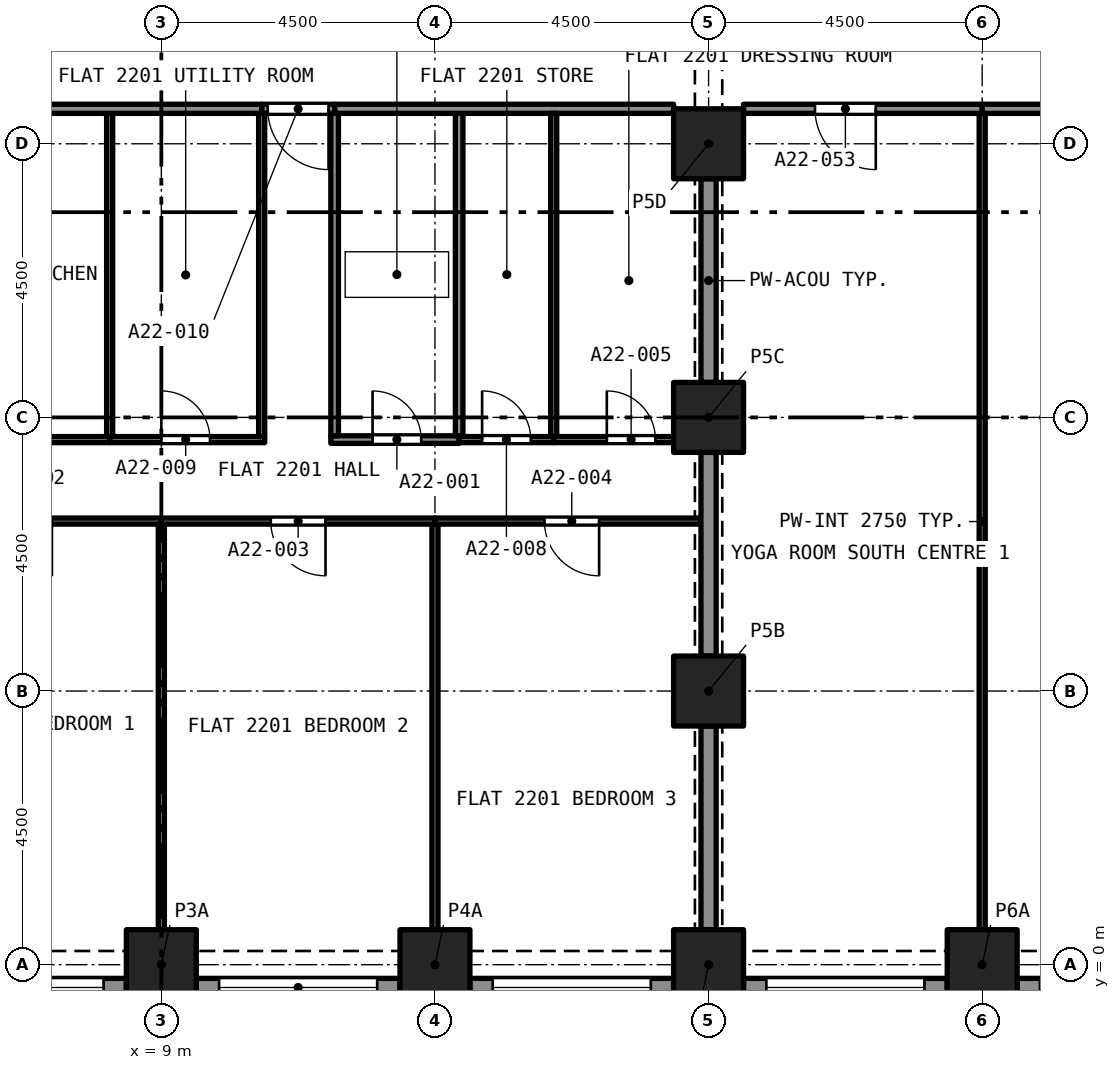
"""IFC4 building model, lengths in metres.
Left out: names, types, materials, properties, quantities, classifications, styles, units other than length and angle.
Written with IfcOpenShell. Run it as: python <this file> out.ifc"""

import sys

from ifc_helpers import new_model, si_unit, direction, frame, frame_2d, origin, origin_2d, place, context, subcontext, project, spatial, rectangle, extrude, element, fill, save


model = new_model("IFC4")
c1 = context("Model", 3, precision=1e-05, world=origin(), true_north=direction((0.0, 1.0)))
c2 = subcontext(c1, "Body", "Model", "MODEL_VIEW")
j1 = project(units=[si_unit("LENGTHUNIT", "METRE"), si_unit("PLANEANGLEUNIT", "RADIAN")], contexts=[c1])
p1 = place(None, origin())
s1 = spatial("IfcSite", under=j1, at=p1, CompositionType="ELEMENT")
p2 = place(p1, origin())
s2 = spatial("IfcBuilding", under=s1, at=p2, CompositionType="ELEMENT")
p3 = place(p2, frame((0.0, 0.0, 83.2)))
s3 = spatial("IfcBuildingStorey", under=s2, at=p3, CompositionType="ELEMENT", Elevation=83.2)
for number, where, z_axis, x_axis in (
    (1, (9.0, 0.0, 0.0), (0.0, 0.0, 1.0), (1.0, 0.0, 0.0)),
    (2, (13.5, 0.0, 0.0), (0.0, 0.0, 1.0), (1.0, 0.0, 0.0)),
    (3, (18.0, 0.0, 0.0), (0.0, 0.0, 1.0), (1.0, 0.0, 0.0)),
    (4, (22.5, 0.0, 0.0), (0.0, 0.0, 1.0), (1.0, 0.0, 0.0)),
    (5, (18.0, 4.5, 0.0), (0.0, 0.0, 1.0), (1.0, 0.0, 0.0)),
    (6, (18.0, 9.0, 0.0), (0.0, 0.0, 1.0), (1.0, 0.0, 0.0)),
    (7, (18.0, 13.5, 0.0), (0.0, 0.0, 1.0), (1.0, 0.0, 0.0)),
):
    element("IfcColumn", number, at=place(p3, frame(where, z_axis=z_axis, x_axis=x_axis)), inside=s3, PredefinedType="COLUMN", context=c2, shape_type="SweptSolid", body=[
        extrude(rectangle(XDim=1.15, YDim=1.15, at=origin_2d()), origin(), (0.0, 0.0, 1.0), 3.2),
    ])
p4 = place(p3, frame((8.425, -0.375, 0.0), z_axis=(0.0, 0.0, 1.0), x_axis=(-1.0, 0.0, 0.0)))
e8 = element("IfcWall", 8, at=p4, inside=s3, PredefinedType="SOLIDWALL", context=c2, shape_type="SweptSolid", body=[
    extrude(rectangle(XDim=3.35, YDim=0.3, at=frame_2d((1.675, 0.0))), origin(), (0.0, 0.0, 1.0), 3.2),
])
p5 = place(p4, frame((0.375, 0.0, 0.45)))
e9 = element("IfcOpeningElement", 9, at=p5, cuts=e8, PredefinedType="OPENING", context=c2, shape_type="SweptSolid", body=[
    extrude(rectangle(XDim=2.6, YDim=1.95, at=frame_2d((1.3, 0.975))), frame((0.0, 0.16, 0.0), z_axis=(0.0, -1.0, 0.0), x_axis=(1.0, 0.0, 0.0)), (0.0, 0.0, 1.0), 0.32),
])
p6 = place(p3, frame((12.925, -0.375, 0.0), z_axis=(0.0, 0.0, 1.0), x_axis=(-1.0, 0.0, 0.0)))
e10 = element("IfcWall", 10, at=p6, inside=s3, PredefinedType="SOLIDWALL", context=c2, shape_type="SweptSolid", body=[
    extrude(rectangle(XDim=3.35, YDim=0.3, at=frame_2d((1.675, 0.0))), origin(), (0.0, 0.0, 1.0), 3.2),
])
p7 = place(p6, frame((0.375, 0.0, 0.45)))
e11 = element("IfcOpeningElement", 11, at=p7, cuts=e10, PredefinedType="OPENING", context=c2, shape_type="SweptSolid", body=[
    extrude(rectangle(XDim=2.6, YDim=1.95, at=frame_2d((1.3, 0.975))), frame((0.0, 0.16, 0.0), z_axis=(0.0, -1.0, 0.0), x_axis=(1.0, 0.0, 0.0)), (0.0, 0.0, 1.0), 0.32),
])
p8 = place(p3, frame((17.425, -0.375, 0.0), z_axis=(0.0, 0.0, 1.0), x_axis=(-1.0, 0.0, 0.0)))
e12 = element("IfcWall", 12, at=p8, inside=s3, PredefinedType="SOLIDWALL", context=c2, shape_type="SweptSolid", body=[
    extrude(rectangle(XDim=3.35, YDim=0.3, at=frame_2d((1.675, 0.0))), origin(), (0.0, 0.0, 1.0), 3.2),
])
p9 = place(p8, frame((0.375, 0.0, 0.45)))
e13 = element("IfcOpeningElement", 13, at=p9, cuts=e12, PredefinedType="OPENING", context=c2, shape_type="SweptSolid", body=[
    extrude(rectangle(XDim=2.6, YDim=1.95, at=frame_2d((1.3, 0.975))), frame((0.0, 0.16, 0.0), z_axis=(0.0, -1.0, 0.0), x_axis=(1.0, 0.0, 0.0)), (0.0, 0.0, 1.0), 0.32),
])
p10 = place(p3, frame((21.925, -0.375, 0.0), z_axis=(0.0, 0.0, 1.0), x_axis=(-1.0, 0.0, 0.0)))
e14 = element("IfcWall", 14, at=p10, inside=s3, PredefinedType="SOLIDWALL", context=c2, shape_type="SweptSolid", body=[
    extrude(rectangle(XDim=3.35, YDim=0.3, at=frame_2d((1.675, 0.0))), origin(), (0.0, 0.0, 1.0), 3.2),
])
p11 = place(p10, frame((0.375, 0.0, 0.45)))
e15 = element("IfcOpeningElement", 15, at=p11, cuts=e14, PredefinedType="OPENING", context=c2, shape_type="SweptSolid", body=[
    extrude(rectangle(XDim=2.6, YDim=1.95, at=frame_2d((1.3, 0.975))), frame((0.0, 0.16, 0.0), z_axis=(0.0, -1.0, 0.0), x_axis=(1.0, 0.0, 0.0)), (0.0, 0.0, 1.0), 0.32),
])
p12 = place(p3, frame((26.425, -0.375, 0.0), z_axis=(0.0, 0.0, 1.0), x_axis=(-1.0, 0.0, 0.0)))
e16 = element("IfcWall", 16, at=p12, inside=s3, PredefinedType="SOLIDWALL", context=c2, shape_type="SweptSolid", body=[
    extrude(rectangle(XDim=3.35, YDim=0.3, at=frame_2d((1.675, 0.0))), origin(), (0.0, 0.0, 1.0), 3.2),
])
p13 = place(p12, frame((0.375, 0.0, 0.45)))
e17 = element("IfcOpeningElement", 17, at=p13, cuts=e16, PredefinedType="OPENING", context=c2, shape_type="SweptSolid", body=[
    extrude(rectangle(XDim=2.6, YDim=1.95, at=frame_2d((1.3, 0.975))), frame((0.0, 0.16, 0.0), z_axis=(0.0, -1.0, 0.0), x_axis=(1.0, 0.0, 0.0)), (0.0, 0.0, 1.0), 0.32),
])
p14 = place(p3, frame((11.788, 8.635, 0.0), z_axis=(0.0, 0.0, 1.0), x_axis=(1.0, 0.0, 0.0)))
e18 = element("IfcWall", 18, at=p14, inside=s3, PredefinedType="PARTITIONING", context=c2, shape_type="SweptSolid", body=[
    extrude(rectangle(XDim=2.11, YDim=0.125, at=frame_2d((1.055, 0.0))), origin(), (0.0, 0.0, 1.0), 2.9),
])
p15 = place(p14, frame((0.686, 0.0, 0.0)))
e19 = element("IfcOpeningElement", 19, at=p15, cuts=e18, PredefinedType="OPENING", context=c2, shape_type="SweptSolid", body=[
    extrude(rectangle(XDim=0.8, YDim=2.1, at=frame_2d((0.4, 1.05))), frame((0.0, 0.073, 0.0), z_axis=(0.0, -1.0, 0.0), x_axis=(1.0, 0.0, 0.0)), (0.0, 0.0, 1.0), 0.145),
])
for number, where, z_axis, x_axis in (
    (20, (11.85, 8.698, 0.0), (0.0, 0.0, 1.0), (0.0, 1.0, 0.0)),
    (21, (13.898, 8.698, 0.0), (0.0, 0.0, 1.0), (0.0, 1.0, 0.0)),
):
    element("IfcWall", number, at=place(p3, frame(where, z_axis=z_axis, x_axis=x_axis)), inside=s3, PredefinedType="PARTITIONING", context=c2, shape_type="SweptSolid", body=[
        extrude(rectangle(XDim=5.302, YDim=0.125, at=frame_2d((2.651, 0.0))), origin(), (0.0, 0.0, 1.0), 2.9),
    ])
p16 = place(p3, frame((11.85, 14.075, 0.0), z_axis=(0.0, 0.0, 1.0), x_axis=(1.0, 0.0, 0.0)))
e22 = element("IfcWall", 22, at=p16, inside=s3, PredefinedType="PARTITIONING", context=c2, shape_type="SweptSolid", body=[
    extrude(rectangle(XDim=5.575, YDim=0.15, at=frame_2d((2.788, 0.0))), origin(), (0.0, 0.0, 1.0), 2.9),
])
p17 = place(p3, frame((9.0, 0.575, 0.0), z_axis=(0.0, 0.0, 1.0), x_axis=(0.0, 1.0, 0.0)))
e23 = element("IfcWall", 23, at=p17, inside=s3, PredefinedType="PARTITIONING", context=c2, shape_type="SweptSolid", body=[
    extrude(rectangle(XDim=6.67, YDim=0.1, at=frame_2d((3.335, 0.0))), origin(), (0.0, 0.0, 1.0), 2.9),
])
p18 = place(p3, frame((9.0, 7.295, 0.0), z_axis=(0.0, 0.0, 1.0), x_axis=(-1.0, 0.0, 0.0)))
e24 = element("IfcWall", 24, at=p18, inside=s3, PredefinedType="PARTITIONING", context=c2, shape_type="SweptSolid", body=[
    extrude(rectangle(XDim=4.45, YDim=0.1, at=frame_2d((2.225, 0.0))), origin(), (0.0, 0.0, 1.0), 2.9),
])
p19 = place(p18, frame((1.8, 0.0, 0.0)))
e25 = element("IfcOpeningElement", 25, at=p19, cuts=e24, PredefinedType="OPENING", context=c2, shape_type="SweptSolid", body=[
    extrude(rectangle(XDim=0.9, YDim=2.1, at=frame_2d((0.45, 1.05))), frame((0.0, 0.06, 0.0), z_axis=(0.0, -1.0, 0.0), x_axis=(1.0, 0.0, 0.0)), (0.0, 0.0, 1.0), 0.12),
])
p20 = place(p3, frame((13.5, 0.575, 0.0), z_axis=(0.0, 0.0, 1.0), x_axis=(0.0, 1.0, 0.0)))
e26 = element("IfcWall", 26, at=p20, inside=s3, PredefinedType="PARTITIONING", context=c2, shape_type="SweptSolid", body=[
    extrude(rectangle(XDim=6.67, YDim=0.1, at=frame_2d((3.335, 0.0))), origin(), (0.0, 0.0, 1.0), 2.9),
])
p21 = place(p3, frame((13.5, 7.295, 0.0), z_axis=(0.0, 0.0, 1.0), x_axis=(-1.0, 0.0, 0.0)))
e27 = element("IfcWall", 27, at=p21, inside=s3, PredefinedType="PARTITIONING", context=c2, shape_type="SweptSolid", body=[
    extrude(rectangle(XDim=4.5, YDim=0.1, at=frame_2d((2.25, 0.0))), origin(), (0.0, 0.0, 1.0), 2.9),
])
p22 = place(p21, frame((1.8, 0.0, 0.0)))
e28 = element("IfcOpeningElement", 28, at=p22, cuts=e27, PredefinedType="OPENING", context=c2, shape_type="SweptSolid", body=[
    extrude(rectangle(XDim=0.9, YDim=2.1, at=frame_2d((0.45, 1.05))), frame((0.0, 0.06, 0.0), z_axis=(0.0, -1.0, 0.0), x_axis=(1.0, 0.0, 0.0)), (0.0, 0.0, 1.0), 0.12),
])
p23 = place(p3, frame((17.875, 7.295, 0.0), z_axis=(0.0, 0.0, 1.0), x_axis=(-1.0, 0.0, 0.0)))
e29 = element("IfcWall", 29, at=p23, inside=s3, PredefinedType="PARTITIONING", context=c2, shape_type="SweptSolid", body=[
    extrude(rectangle(XDim=4.375, YDim=0.1, at=frame_2d((2.188, 0.0))), origin(), (0.0, 0.0, 1.0), 2.9),
])
p24 = place(p23, frame((1.675, 0.0, 0.0)))
e30 = element("IfcOpeningElement", 30, at=p24, cuts=e29, PredefinedType="OPENING", context=c2, shape_type="SweptSolid", body=[
    extrude(rectangle(XDim=0.9, YDim=2.1, at=frame_2d((0.45, 1.05))), frame((0.0, 0.06, 0.0), z_axis=(0.0, -1.0, 0.0), x_axis=(1.0, 0.0, 0.0)), (0.0, 0.0, 1.0), 0.12),
])
for number, where, z_axis, x_axis in (
    (31, (18.0, 5.075, 0.0), (0.0, 0.0, 1.0), (0.0, 1.0, 0.0)),
    (32, (18.0, 0.575, 0.0), (0.0, 0.0, 1.0), (0.0, 1.0, 0.0)),
):
    element("IfcWall", number, at=place(p3, frame(where, z_axis=z_axis, x_axis=x_axis)), inside=s3, PredefinedType="PARTITIONING", context=c2, shape_type="SweptSolid", body=[
        extrude(rectangle(XDim=3.35, YDim=0.25, at=frame_2d((1.675, 0.0))), origin(), (0.0, 0.0, 1.0), 2.38),
    ])
p25 = place(p3, frame((15.453, 8.635, 0.0), z_axis=(0.0, 0.0, 1.0), x_axis=(1.0, 0.0, 0.0)))
e33 = element("IfcWall", 33, at=p25, inside=s3, PredefinedType="PARTITIONING", context=c2, shape_type="SweptSolid", body=[
    extrude(rectangle(XDim=1.972, YDim=0.1, at=frame_2d((0.986, 0.0))), origin(), (0.0, 0.0, 1.0), 2.9),
])
p26 = place(p25, frame((0.874, 0.0, 0.0)))
e34 = element("IfcOpeningElement", 34, at=p26, cuts=e33, PredefinedType="OPENING", context=c2, shape_type="SweptSolid", body=[
    extrude(rectangle(XDim=0.8, YDim=2.1, at=frame_2d((0.4, 1.05))), frame((0.0, 0.06, 0.0), z_axis=(0.0, -1.0, 0.0), x_axis=(1.0, 0.0, 0.0)), (0.0, 0.0, 1.0), 0.12),
])
p27 = place(p3, frame((15.453, 8.685, 0.0), z_axis=(0.0, 0.0, 1.0), x_axis=(0.0, 1.0, 0.0)))
e35 = element("IfcWall", 35, at=p27, inside=s3, PredefinedType="PARTITIONING", context=c2, shape_type="SweptSolid", body=[
    extrude(rectangle(XDim=5.315, YDim=0.1, at=frame_2d((2.657, 0.0))), origin(), (0.0, 0.0, 1.0), 2.9),
])
p28 = place(p3, frame((18.0, 9.575, 0.0), z_axis=(0.0, 0.0, 1.0), x_axis=(0.0, 1.0, 0.0)))
e36 = element("IfcWall", 36, at=p28, inside=s3, PredefinedType="PARTITIONING", context=c2, shape_type="SweptSolid", body=[
    extrude(rectangle(XDim=3.35, YDim=0.25, at=frame_2d((1.675, 0.0))), origin(), (0.0, 0.0, 1.0), 2.38),
])
p29 = place(p3, frame((4.55, 8.635, 0.0), z_axis=(0.0, 0.0, 1.0), x_axis=(1.0, 0.0, 0.0)))
e37 = element("IfcWall", 37, at=p29, inside=s3, PredefinedType="PARTITIONING", context=c2, shape_type="SweptSolid", body=[
    extrude(rectangle(XDim=3.6, YDim=0.1, at=frame_2d((1.8, 0.0))), origin(), (0.0, 0.0, 1.0), 2.9),
])
p30 = place(p29, frame((1.325, 0.0, 0.0)))
e38 = element("IfcOpeningElement", 38, at=p30, cuts=e37, PredefinedType="OPENING", context=c2, shape_type="SweptSolid", body=[
    extrude(rectangle(XDim=0.9, YDim=2.1, at=frame_2d((0.45, 1.05))), frame((0.0, 0.06, 0.0), z_axis=(0.0, -1.0, 0.0), x_axis=(1.0, 0.0, 0.0)), (0.0, 0.0, 1.0), 0.12),
])
p31 = place(p3, frame((13.898, 8.635, 0.0), z_axis=(0.0, 0.0, 1.0), x_axis=(1.0, 0.0, 0.0)))
e39 = element("IfcWall", 39, at=p31, inside=s3, PredefinedType="PARTITIONING", context=c2, shape_type="SweptSolid", body=[
    extrude(rectangle(XDim=1.555, YDim=0.1, at=frame_2d((0.778, 0.0))), origin(), (0.0, 0.0, 1.0), 2.9),
])
p32 = place(p31, frame((0.378, 0.0, 0.0)))
e40 = element("IfcOpeningElement", 40, at=p32, cuts=e39, PredefinedType="OPENING", context=c2, shape_type="SweptSolid", body=[
    extrude(rectangle(XDim=0.8, YDim=2.1, at=frame_2d((0.4, 1.05))), frame((0.0, 0.06, 0.0), z_axis=(0.0, -1.0, 0.0), x_axis=(1.0, 0.0, 0.0)), (0.0, 0.0, 1.0), 0.12),
])
p33 = place(p3, frame((8.15, 8.635, 0.0), z_axis=(0.0, 0.0, 1.0), x_axis=(1.0, 0.0, 0.0)))
e41 = element("IfcWall", 41, at=p33, inside=s3, PredefinedType="PARTITIONING", context=c2, shape_type="SweptSolid", body=[
    extrude(rectangle(XDim=2.55, YDim=0.1, at=frame_2d((1.275, 0.0))), origin(), (0.0, 0.0, 1.0), 2.9),
])
p34 = place(p33, frame((0.85, 0.0, 0.0)))
e42 = element("IfcOpeningElement", 42, at=p34, cuts=e41, PredefinedType="OPENING", context=c2, shape_type="SweptSolid", body=[
    extrude(rectangle(XDim=0.8, YDim=2.1, at=frame_2d((0.4, 1.05))), frame((0.0, 0.06, 0.0), z_axis=(0.0, -1.0, 0.0), x_axis=(1.0, 0.0, 0.0)), (0.0, 0.0, 1.0), 0.12),
])
p35 = place(p3, frame((10.65, 8.685, 0.0), z_axis=(0.0, 0.0, 1.0), x_axis=(0.0, 1.0, 0.0)))
e43 = element("IfcWall", 43, at=p35, inside=s3, PredefinedType="PARTITIONING", context=c2, shape_type="SweptSolid", body=[
    extrude(rectangle(XDim=5.315, YDim=0.1, at=frame_2d((2.657, 0.0))), origin(), (0.0, 0.0, 1.0), 2.9),
])
p36 = place(p3, frame((11.85, 14.075, 0.0), z_axis=(0.0, 0.0, 1.0), x_axis=(-1.0, 0.0, 0.0)))
e44 = element("IfcWall", 44, at=p36, inside=s3, PredefinedType="PARTITIONING", context=c2, shape_type="SweptSolid", body=[
    extrude(rectangle(XDim=1.2, YDim=0.15, at=frame_2d((0.6, 0.0))), origin(), (0.0, 0.0, 1.0), 2.9),
])
p37 = place(p36, frame((0.1, 0.0, 0.0)))
e45 = element("IfcOpeningElement", 45, at=p37, cuts=e44, PredefinedType="OPENING", context=c2, shape_type="SweptSolid", body=[
    extrude(rectangle(XDim=1.0, YDim=2.1, at=frame_2d((0.5, 1.05))), frame((0.0, 0.085, 0.0), z_axis=(0.0, -1.0, 0.0), x_axis=(1.0, 0.0, 0.0)), (0.0, 0.0, 1.0), 0.17),
])
p38 = place(p3, frame((8.15, 8.685, 0.0), z_axis=(0.0, 0.0, 1.0), x_axis=(0.0, 1.0, 0.0)))
e46 = element("IfcWall", 46, at=p38, inside=s3, PredefinedType="PARTITIONING", context=c2, shape_type="SweptSolid", body=[
    extrude(rectangle(XDim=5.315, YDim=0.1, at=frame_2d((2.657, 0.0))), origin(), (0.0, 0.0, 1.0), 2.9),
])
p39 = place(p3, frame((0.575, 14.075, 0.0), z_axis=(0.0, 0.0, 1.0), x_axis=(1.0, 0.0, 0.0)))
e47 = element("IfcWall", 47, at=p39, inside=s3, PredefinedType="PARTITIONING", context=c2, shape_type="SweptSolid", body=[
    extrude(rectangle(XDim=10.075, YDim=0.15, at=frame_2d((5.038, 0.0))), origin(), (0.0, 0.0, 1.0), 2.9),
])
p40 = place(p3, frame((22.5, 0.575, 0.0), z_axis=(0.0, 0.0, 1.0), x_axis=(0.0, 1.0, 0.0)))
e48 = element("IfcWall", 48, at=p40, inside=s3, PredefinedType="PARTITIONING", context=c2, shape_type="SweptSolid", body=[
    extrude(rectangle(XDim=13.425, YDim=0.1, at=frame_2d((6.712, 0.0))), origin(), (0.0, 0.0, 1.0), 2.75),
])
p41 = place(p3, frame((22.5, 14.075, 0.0), z_axis=(0.0, 0.0, 1.0), x_axis=(-1.0, 0.0, 0.0)))
e49 = element("IfcWall", 49, at=p41, inside=s3, PredefinedType="PARTITIONING", context=c2, shape_type="SweptSolid", body=[
    extrude(rectangle(XDim=3.925, YDim=0.15, at=frame_2d((1.962, 0.0))), origin(), (0.0, 0.0, 1.0), 2.75),
])
p42 = place(p41, frame((1.75, 0.0, 0.0)))
e50 = element("IfcOpeningElement", 50, at=p42, cuts=e49, PredefinedType="OPENING", context=c2, shape_type="SweptSolid", body=[
    extrude(rectangle(XDim=1.0, YDim=2.1, at=frame_2d((0.5, 1.05))), frame((0.0, 0.085, 0.0), z_axis=(0.0, -1.0, 0.0), x_axis=(1.0, 0.0, 0.0)), (0.0, 0.0, 1.0), 0.17),
])
p43 = place(p3, frame((27.0, 14.075, 0.0), z_axis=(0.0, 0.0, 1.0), x_axis=(-1.0, 0.0, 0.0)))
e51 = element("IfcWall", 51, at=p43, inside=s3, PredefinedType="PARTITIONING", context=c2, shape_type="SweptSolid", body=[
    extrude(rectangle(XDim=4.5, YDim=0.15, at=frame_2d((2.25, 0.0))), origin(), (0.0, 0.0, 1.0), 2.75),
])
p44 = place(p43, frame((1.75, 0.0, 0.0)))
e52 = element("IfcOpeningElement", 52, at=p44, cuts=e51, PredefinedType="OPENING", context=c2, shape_type="SweptSolid", body=[
    extrude(rectangle(XDim=1.0, YDim=2.1, at=frame_2d((0.5, 1.05))), frame((0.0, 0.085, 0.0), z_axis=(0.0, -1.0, 0.0), x_axis=(1.0, 0.0, 0.0)), (0.0, 0.0, 1.0), 0.17),
])
p45 = place(p5, origin())
e53 = element("IfcWindow", 53, at=p45, inside=s3, PartitioningType="SINGLE_PANEL", PredefinedType="WINDOW", context=c2, shape_type="SweptSolid", body=[
    extrude(rectangle(XDim=2.6, YDim=1.95, at=frame_2d((1.3, 0.975))), frame((0.0, 0.03, 0.0), z_axis=(0.0, -1.0, 0.0), x_axis=(1.0, 0.0, 0.0)), (0.0, 0.0, 1.0), 0.06),
])
fill(e9, e53)
p46 = place(p7, origin())
e54 = element("IfcWindow", 54, at=p46, inside=s3, PartitioningType="SINGLE_PANEL", PredefinedType="WINDOW", context=c2, shape_type="SweptSolid", body=[
    extrude(rectangle(XDim=2.6, YDim=1.95, at=frame_2d((1.3, 0.975))), frame((0.0, 0.03, 0.0), z_axis=(0.0, -1.0, 0.0), x_axis=(1.0, 0.0, 0.0)), (0.0, 0.0, 1.0), 0.06),
])
fill(e11, e54)
p47 = place(p9, origin())
e55 = element("IfcWindow", 55, at=p47, inside=s3, PartitioningType="SINGLE_PANEL", PredefinedType="WINDOW", context=c2, shape_type="SweptSolid", body=[
    extrude(rectangle(XDim=2.6, YDim=1.95, at=frame_2d((1.3, 0.975))), frame((0.0, 0.03, 0.0), z_axis=(0.0, -1.0, 0.0), x_axis=(1.0, 0.0, 0.0)), (0.0, 0.0, 1.0), 0.06),
])
fill(e13, e55)
p48 = place(p11, origin())
e56 = element("IfcWindow", 56, at=p48, inside=s3, PartitioningType="SINGLE_PANEL", PredefinedType="WINDOW", context=c2, shape_type="SweptSolid", body=[
    extrude(rectangle(XDim=2.6, YDim=1.95, at=frame_2d((1.3, 0.975))), frame((0.0, 0.03, 0.0), z_axis=(0.0, -1.0, 0.0), x_axis=(1.0, 0.0, 0.0)), (0.0, 0.0, 1.0), 0.06),
])
fill(e15, e56)
p49 = place(p15, origin())
e57 = element("IfcDoor", 57, at=p49, inside=s3, OperationType="SINGLE_SWING_RIGHT", PredefinedType="DOOR", context=c2, shape_type="SweptSolid", body=[
    extrude(rectangle(XDim=0.8, YDim=2.1, at=frame_2d((0.4, 1.05))), frame((0.0, 0.025, 0.0), z_axis=(0.0, -1.0, 0.0), x_axis=(1.0, 0.0, 0.0)), (0.0, 0.0, 1.0), 0.05),
])
fill(e19, e57)
p50 = place(p22, origin())
e58 = element("IfcDoor", 58, at=p50, inside=s3, OperationType="SINGLE_SWING_LEFT", PredefinedType="DOOR", context=c2, shape_type="SweptSolid", body=[
    extrude(rectangle(XDim=0.9, YDim=2.1, at=frame_2d((0.45, 1.05))), frame((0.0, 0.025, 0.0), z_axis=(0.0, -1.0, 0.0), x_axis=(1.0, 0.0, 0.0)), (0.0, 0.0, 1.0), 0.05),
])
fill(e28, e58)
p51 = place(p24, origin())
e59 = element("IfcDoor", 59, at=p51, inside=s3, OperationType="SINGLE_SWING_LEFT", PredefinedType="DOOR", context=c2, shape_type="SweptSolid", body=[
    extrude(rectangle(XDim=0.9, YDim=2.1, at=frame_2d((0.45, 1.05))), frame((0.0, 0.025, 0.0), z_axis=(0.0, -1.0, 0.0), x_axis=(1.0, 0.0, 0.0)), (0.0, 0.0, 1.0), 0.05),
])
fill(e30, e59)
p52 = place(p26, origin())
e60 = element("IfcDoor", 60, at=p52, inside=s3, OperationType="SINGLE_SWING_RIGHT", PredefinedType="DOOR", context=c2, shape_type="SweptSolid", body=[
    extrude(rectangle(XDim=0.8, YDim=2.1, at=frame_2d((0.4, 1.05))), frame((0.0, 0.025, 0.0), z_axis=(0.0, -1.0, 0.0), x_axis=(1.0, 0.0, 0.0)), (0.0, 0.0, 1.0), 0.05),
])
fill(e34, e60)
p53 = place(p32, origin())
e61 = element("IfcDoor", 61, at=p53, inside=s3, OperationType="SINGLE_SWING_RIGHT", PredefinedType="DOOR", context=c2, shape_type="SweptSolid", body=[
    extrude(rectangle(XDim=0.8, YDim=2.1, at=frame_2d((0.4, 1.05))), frame((0.0, 0.025, 0.0), z_axis=(0.0, -1.0, 0.0), x_axis=(1.0, 0.0, 0.0)), (0.0, 0.0, 1.0), 0.05),
])
fill(e40, e61)
p54 = place(p34, origin())
e62 = element("IfcDoor", 62, at=p54, inside=s3, OperationType="SINGLE_SWING_LEFT", PredefinedType="DOOR", context=c2, shape_type="SweptSolid", body=[
    extrude(rectangle(XDim=0.8, YDim=2.1, at=frame_2d((0.4, 1.05))), frame((0.0, 0.025, 0.0), z_axis=(0.0, -1.0, 0.0), x_axis=(1.0, 0.0, 0.0)), (0.0, 0.0, 1.0), 0.05),
])
fill(e42, e62)
p55 = place(p37, origin())
e63 = element("IfcDoor", 63, at=p55, inside=s3, OperationType="SINGLE_SWING_RIGHT", PredefinedType="DOOR", context=c2, shape_type="SweptSolid", body=[
    extrude(rectangle(XDim=1.0, YDim=2.1, at=frame_2d((0.5, 1.05))), frame((0.0, 0.025, 0.0), z_axis=(0.0, -1.0, 0.0), x_axis=(1.0, 0.0, 0.0)), (0.0, 0.0, 1.0), 0.05),
])
fill(e45, e63)
p56 = place(p42, origin())
e64 = element("IfcDoor", 64, at=p56, inside=s3, OperationType="SINGLE_SWING_RIGHT", PredefinedType="DOOR", context=c2, shape_type="SweptSolid", body=[
    extrude(rectangle(XDim=1.0, YDim=2.1, at=frame_2d((0.5, 1.05))), frame((0.0, 0.025, 0.0), z_axis=(0.0, -1.0, 0.0), x_axis=(1.0, 0.0, 0.0)), (0.0, 0.0, 1.0), 0.05),
])
fill(e50, e64)
save(model, sys.argv[1])
